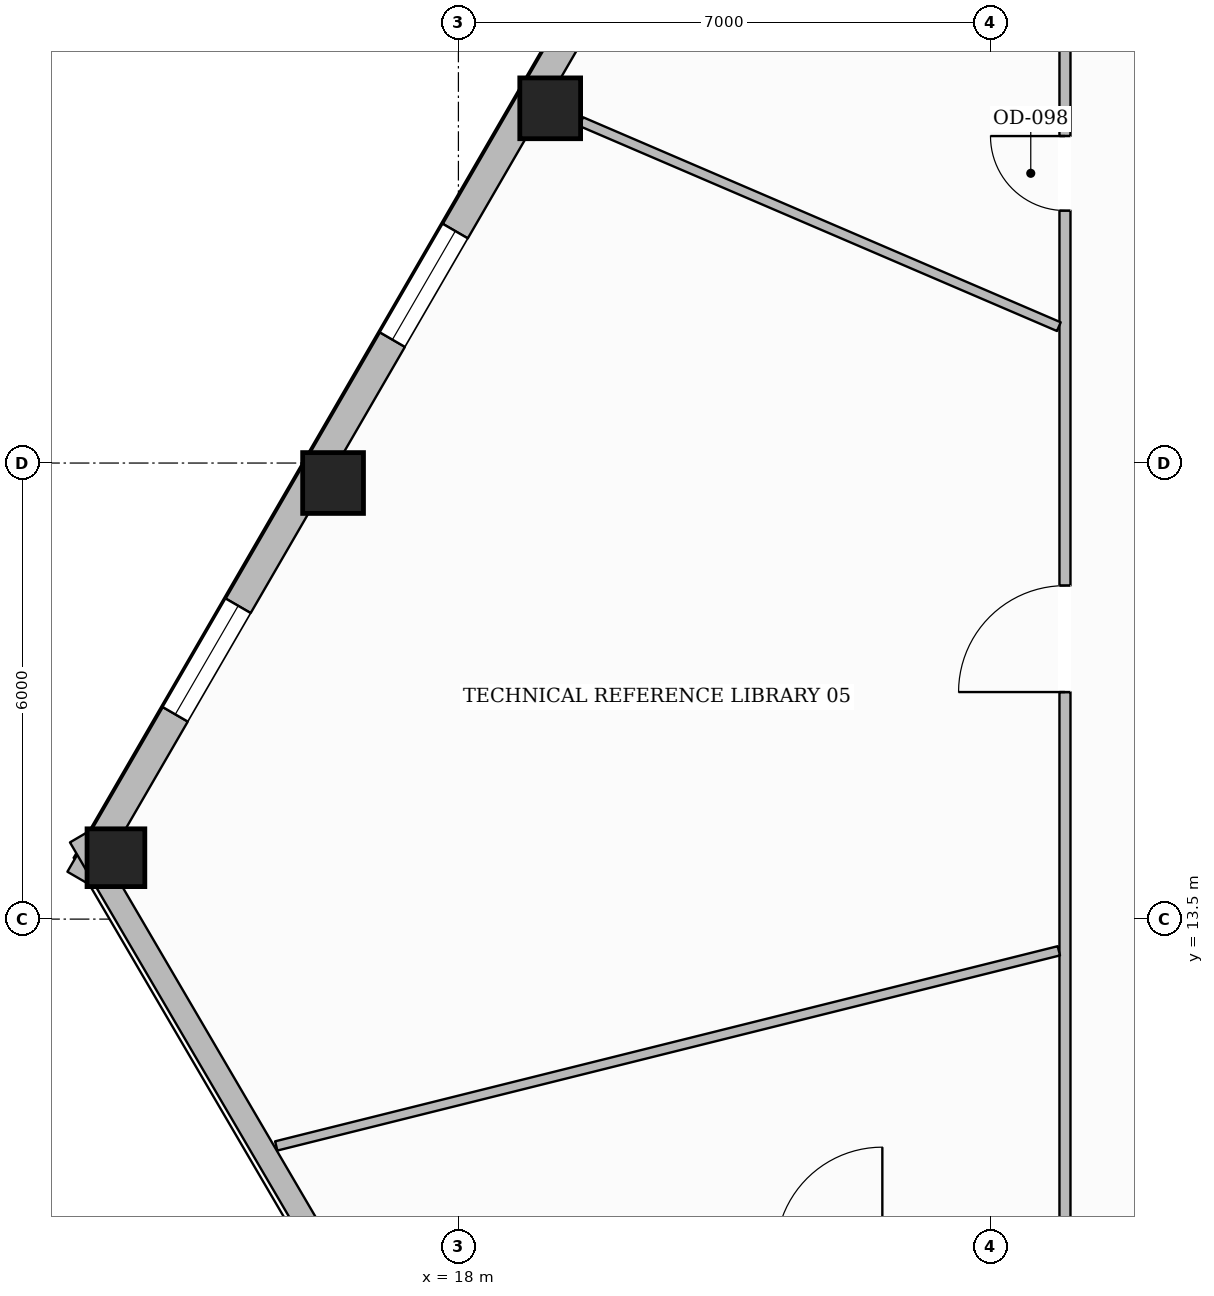
"""IFC4 building model, lengths in metres.
Left out: names, types, materials, properties, quantities, classifications, styles, units other than length and angle.
Written with IfcOpenShell. Run it as: python <this file> out.ifc"""

import sys

from ifc_helpers import new_model, si_unit, direction, frame, frame_2d, origin, origin_2d, place, context, subcontext, project, spatial, rectangle, hollow_rectangle, extrude, element, fill, save


model = new_model("IFC4")
c1 = context("Model", 3, precision=1e-05, world=origin(), true_north=direction((0.0, 1.0)))
c2 = subcontext(c1, "Body", "Model", "MODEL_VIEW")
j1 = project(units=[si_unit("LENGTHUNIT", "METRE"), si_unit("PLANEANGLEUNIT", "RADIAN")], contexts=[c1])
p1 = place(None, origin())
s1 = spatial("IfcSite", under=j1, at=p1, CompositionType="ELEMENT")
p2 = place(p1, origin())
s2 = spatial("IfcBuilding", under=s1, at=p2, CompositionType="ELEMENT")
p3 = place(p2, frame((0.0, 0.0, 52.2)))
s3 = spatial("IfcBuildingStorey", under=s2, at=p3, CompositionType="ELEMENT", Elevation=52.2)
for number, where, z_axis, x_axis in (
    (1, (19.208, 24.167, 0.0), (0.0, 0.0, 1.0), (1.0, 0.0, 0.0)),
    (2, (16.351, 19.237, 0.0), (0.0, 0.0, 1.0), (1.0, 0.0, 0.0)),
):
    element("IfcColumn", number, at=place(p3, frame(where, z_axis=z_axis, x_axis=x_axis)), inside=s3, PredefinedType="COLUMN", context=c2, shape_type="SweptSolid", body=[
        extrude(hollow_rectangle(XDim=0.8, YDim=0.8, WallThickness=0.036, at=origin_2d()), origin(), (0.0, 0.0, 1.0), 3.59),
    ])
p4 = place(p3, frame((13.494, 14.308, 0.0), z_axis=(0.0, 0.0, 1.0), x_axis=(1.0, 0.0, 0.0)))
e3 = element("IfcColumn", 3, at=p4, inside=s3, PredefinedType="COLUMN", context=c2, shape_type="SweptSolid", body=[
    extrude(hollow_rectangle(XDim=0.76, YDim=0.76, WallThickness=0.035, at=origin_2d()), origin(), (0.0, 0.0, 1.0), 3.59),
])
p5 = place(p3, frame((13.02, 14.028, 0.0), z_axis=(0.0, 0.0, 1.0), x_axis=(0.501385664719, 0.86522391045, 0.0)))
e4 = element("IfcWall", 4, at=p5, inside=s3, PredefinedType="STANDARD", context=c2, shape_type="SweptSolid", body=[
    extrude(rectangle(XDim=35.142, YDim=0.38, at=frame_2d((17.571, 0.0))), origin(), (0.0, 0.0, 1.0), 2.97),
])
p6 = place(p5, frame((30.991, 0.0, 0.65)))
e5 = element("IfcOpeningElement", 5, at=p6, cuts=e4, PredefinedType="OPENING", context=c2, shape_type="SweptSolid", body=[
    extrude(rectangle(XDim=1.65, YDim=1.75, at=frame_2d((0.825, 0.875))), frame((0.0, 0.2, 0.0), z_axis=(0.0, -1.0, 0.0), x_axis=(1.0, 0.0, 0.0)), (0.0, 0.0, 1.0), 0.4),
])
p7 = place(p5, frame((25.293, 0.0, 0.65)))
e6 = element("IfcOpeningElement", 6, at=p7, cuts=e4, PredefinedType="OPENING", context=c2, shape_type="SweptSolid", body=[
    extrude(rectangle(XDim=1.65, YDim=1.75, at=frame_2d((0.825, 0.875))), frame((0.0, 0.2, 0.0), z_axis=(0.0, -1.0, 0.0), x_axis=(1.0, 0.0, 0.0)), (0.0, 0.0, 1.0), 0.4),
])
p8 = place(p5, frame((13.898, 0.0, 0.65)))
e7 = element("IfcOpeningElement", 7, at=p8, cuts=e4, PredefinedType="OPENING", context=c2, shape_type="SweptSolid", body=[
    extrude(rectangle(XDim=1.65, YDim=1.75, at=frame_2d((0.825, 0.875))), frame((0.0, 0.2, 0.0), z_axis=(0.0, -1.0, 0.0), x_axis=(1.0, 0.0, 0.0)), (0.0, 0.0, 1.0), 0.4),
])
p9 = place(p5, frame((8.201, 0.0, 0.65)))
e8 = element("IfcOpeningElement", 8, at=p9, cuts=e4, PredefinedType="OPENING", context=c2, shape_type="SweptSolid", body=[
    extrude(rectangle(XDim=1.65, YDim=1.75, at=frame_2d((0.825, 0.875))), frame((0.0, 0.2, 0.0), z_axis=(0.0, -1.0, 0.0), x_axis=(1.0, 0.0, 0.0)), (0.0, 0.0, 1.0), 0.4),
])
p10 = place(p5, frame((2.503, 0.0, 0.65)))
e9 = element("IfcOpeningElement", 9, at=p10, cuts=e4, PredefinedType="OPENING", context=c2, shape_type="SweptSolid", body=[
    extrude(rectangle(XDim=1.65, YDim=1.75, at=frame_2d((0.825, 0.875))), frame((0.0, 0.2, 0.0), z_axis=(0.0, -1.0, 0.0), x_axis=(1.0, 0.0, 0.0)), (0.0, 0.0, 1.0), 0.4),
])
p11 = place(p3, frame((20.978, 0.986, 0.0), z_axis=(0.0, 0.0, 1.0), x_axis=(-0.50510939728, 0.863055326604, 0.0)))
e10 = element("IfcWall", 10, at=p11, inside=s3, PredefinedType="STANDARD", context=c2, shape_type="SweptSolid", body=[
    extrude(rectangle(XDim=15.757, YDim=0.3, at=frame_2d((7.878, 0.0))), origin(), (0.0, 0.0, 1.0), 2.97),
])
p12 = place(p11, frame((7.279, 0.0, 0.65)))
e11 = element("IfcOpeningElement", 11, at=p12, cuts=e10, PredefinedType="OPENING", context=c2, shape_type="SweptSolid", body=[
    extrude(rectangle(XDim=1.2, YDim=1.7, at=frame_2d((0.6, 0.85))), frame((0.0, 0.16, 0.0), z_axis=(0.0, -1.0, 0.0), x_axis=(1.0, 0.0, 0.0)), (0.0, 0.0, 1.0), 0.32),
])
p13 = place(p3, frame((25.98, 9.1, 0.0), z_axis=(0.0, 0.0, 1.0), x_axis=(0.0, 1.0, 0.0)))
e12 = element("IfcWall", 12, at=p13, inside=s3, PredefinedType="PARTITIONING", context=c2, shape_type="SweptSolid", body=[
    extrude(rectangle(XDim=16.0, YDim=0.145, at=frame_2d((8.0, 0.0))), origin(), (0.0, 0.0, 1.0), 3.278),
])
p14 = place(p13, frame((13.722, 0.0, 0.0)))
e13 = element("IfcOpeningElement", 13, at=p14, cuts=e12, PredefinedType="OPENING", context=c2, shape_type="SweptSolid", body=[
    extrude(rectangle(XDim=0.98, YDim=2.15, at=frame_2d((0.49, 1.075))), frame((0.0, 0.083, 0.0), z_axis=(0.0, -1.0, 0.0), x_axis=(1.0, 0.0, 0.0)), (0.0, 0.0, 1.0), 0.165),
])
p15 = place(p13, frame((7.387, 0.0, 0.0)))
e14 = element("IfcOpeningElement", 14, at=p15, cuts=e12, PredefinedType="OPENING", context=c2, shape_type="SweptSolid", body=[
    extrude(rectangle(XDim=1.4, YDim=2.2, at=frame_2d((0.7, 1.1))), frame((0.0, 0.083, 0.0), z_axis=(0.0, -1.0, 0.0), x_axis=(1.0, 0.0, 0.0)), (0.0, 0.0, 1.0), 0.165),
])
p16 = place(p3, frame((25.899, 21.294, 0.0), z_axis=(0.0, 0.0, 1.0), x_axis=(-0.918912196595, 0.394462133734, 0.0)))
e15 = element("IfcWall", 15, at=p16, inside=s3, PredefinedType="PARTITIONING", context=c2, shape_type="SweptSolid", body=[
    extrude(rectangle(XDim=6.838, YDim=0.125, at=frame_2d((3.419, 0.0))), origin(), (0.0, 0.0, 1.0), 3.057),
])
p17 = place(p3, frame((25.899, 13.083, 0.0), z_axis=(0.0, 0.0, 1.0), x_axis=(-0.970293892869, -0.241929248874, 0.0)))
e16 = element("IfcWall", 16, at=p17, inside=s3, PredefinedType="PARTITIONING", context=c2, shape_type="SweptSolid", body=[
    extrude(rectangle(XDim=10.611, YDim=0.125, at=frame_2d((5.306, 0.0))), origin(), (0.0, 0.0, 1.0), 3.59),
])
p18 = place(p9, origin())
e17 = element("IfcWindow", 17, at=p18, inside=s3, PartitioningType="SINGLE_PANEL", PredefinedType="WINDOW", context=c2, shape_type="SweptSolid", body=[
    extrude(rectangle(XDim=1.65, YDim=1.75, at=frame_2d((0.825, 0.875))), frame((0.0, 0.03, 0.0), z_axis=(0.0, -1.0, 0.0), x_axis=(1.0, 0.0, 0.0)), (0.0, 0.0, 1.0), 0.06),
])
fill(e8, e17)
p19 = place(p10, origin())
e18 = element("IfcWindow", 18, at=p19, inside=s3, PartitioningType="SINGLE_PANEL", PredefinedType="WINDOW", context=c2, shape_type="SweptSolid", body=[
    extrude(rectangle(XDim=1.65, YDim=1.75, at=frame_2d((0.825, 0.875))), frame((0.0, 0.03, 0.0), z_axis=(0.0, -1.0, 0.0), x_axis=(1.0, 0.0, 0.0)), (0.0, 0.0, 1.0), 0.06),
])
fill(e9, e18)
p20 = place(p14, origin())
e19 = element("IfcDoor", 19, at=p20, inside=s3, OperationType="SINGLE_SWING_RIGHT", PredefinedType="DOOR", context=c2, shape_type="SweptSolid", body=[
    extrude(rectangle(XDim=0.98, YDim=2.15, at=frame_2d((0.49, 1.075))), frame((0.0, 0.025, 0.0), z_axis=(0.0, -1.0, 0.0), x_axis=(1.0, 0.0, 0.0)), (0.0, 0.0, 1.0), 0.05),
])
fill(e13, e19)
p21 = place(p15, origin())
e20 = element("IfcDoor", 20, at=p21, inside=s3, OperationType="SINGLE_SWING_LEFT", PredefinedType="DOOR", context=c2, shape_type="SweptSolid", body=[
    extrude(rectangle(XDim=1.4, YDim=2.2, at=frame_2d((0.7, 1.1))), frame((0.0, 0.025, 0.0), z_axis=(0.0, -1.0, 0.0), x_axis=(1.0, 0.0, 0.0)), (0.0, 0.0, 1.0), 0.05),
])
fill(e14, e20)
save(model, sys.argv[1])
